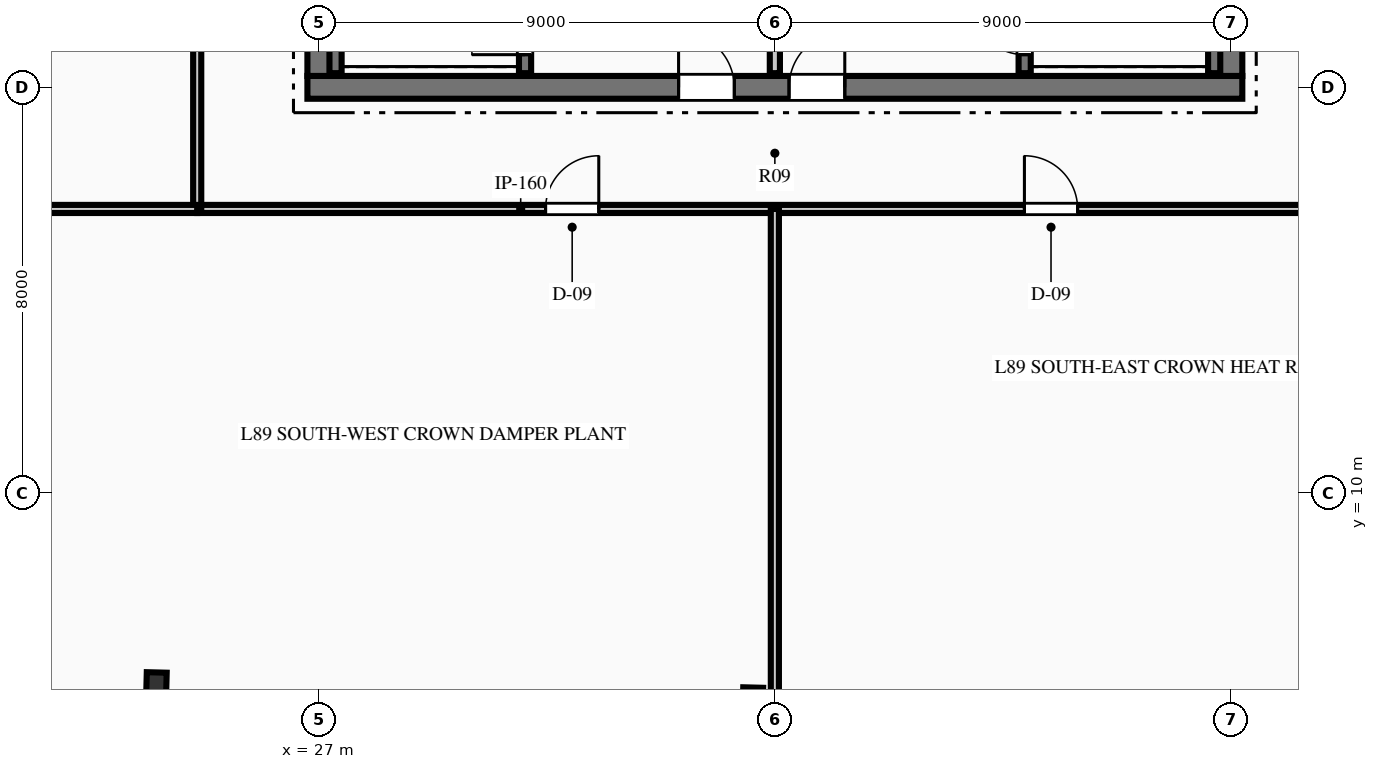
"""IFC4 building model, lengths in metres.
Left out: names, types, materials, properties, quantities, classifications, styles, units other than length and angle.
Written with IfcOpenShell. Run it as: python <this file> out.ifc"""

import sys

from ifc_helpers import new_model, si_unit, direction, frame, frame_2d, origin, origin_2d, place, context, subcontext, project, spatial, rectangle, i_section, extrude, element, fill, save


model = new_model("IFC4")
c1 = context("Model", 3, precision=1e-05, world=origin(), true_north=direction((0.0, 1.0)))
c2 = subcontext(c1, "Body", "Model", "MODEL_VIEW")
j1 = project(units=[si_unit("LENGTHUNIT", "METRE"), si_unit("PLANEANGLEUNIT", "RADIAN")], contexts=[c1])
p1 = place(None, origin())
s1 = spatial("IfcSite", under=j1, at=p1, CompositionType="ELEMENT")
p2 = place(p1, origin())
s2 = spatial("IfcBuilding", under=s1, at=p2, CompositionType="ELEMENT")
p3 = place(p2, frame((0.0, 0.0, 352.2)))
s3 = spatial("IfcBuildingStorey", under=s2, at=p3, CompositionType="ELEMENT", Elevation=352.2)
p4 = place(p3, frame((26.775, 18.0, 0.0), z_axis=(0.0, 0.0, 1.0), x_axis=(1.0, 0.0, 0.0)))
e1 = element("IfcWall", 1, at=p4, inside=s3, PredefinedType="SHEAR", context=c2, shape_type="SweptSolid", body=[
    extrude(rectangle(XDim=18.45, YDim=0.45, at=frame_2d((9.225, 0.0))), origin(), (0.0, 0.0, 1.0), 4.2),
])
p5 = place(p4, frame((7.325, 0.0, 0.0)))
e2 = element("IfcOpeningElement", 2, at=p5, cuts=e1, PredefinedType="OPENING", context=c2, shape_type="SweptSolid", body=[
    extrude(rectangle(XDim=1.1, YDim=2.15, at=frame_2d((0.55, 1.075))), frame((0.0, 0.235, 0.0), z_axis=(0.0, -1.0, 0.0), x_axis=(1.0, 0.0, 0.0)), (0.0, 0.0, 1.0), 0.47),
])
p6 = place(p4, frame((9.505, 0.0, 0.0)))
e3 = element("IfcOpeningElement", 3, at=p6, cuts=e1, PredefinedType="OPENING", context=c2, shape_type="SweptSolid", body=[
    extrude(rectangle(XDim=1.1, YDim=2.15, at=frame_2d((0.55, 1.075))), frame((0.0, 0.235, 0.0), z_axis=(0.0, -1.0, 0.0), x_axis=(1.0, 0.0, 0.0)), (0.0, 0.0, 1.0), 0.47),
])
p7 = place(p3, frame((27.0, 18.225, 0.0), z_axis=(0.0, 0.0, 1.0), x_axis=(0.0, 1.0, 0.0)))
e4 = element("IfcWall", 4, at=p7, inside=s3, PredefinedType="SHEAR", context=c2, shape_type="SweptSolid", body=[
    extrude(rectangle(XDim=15.55, YDim=0.45, at=frame_2d((7.775, 0.0))), origin(), (0.0, 0.0, 1.0), 4.2),
])
p8 = place(p7, frame((10.015, 0.0, 0.0)))
e5 = element("IfcOpeningElement", 5, at=p8, cuts=e4, PredefinedType="OPENING", context=c2, shape_type="SweptSolid", body=[
    extrude(rectangle(XDim=1.4, YDim=2.2, at=frame_2d((0.7, 1.1))), frame((0.0, 0.235, 0.0), z_axis=(0.0, -1.0, 0.0), x_axis=(1.0, 0.0, 0.0)), (0.0, 0.0, 1.0), 0.47),
])
p9 = place(p3, frame((45.0, 18.225, 0.0), z_axis=(0.0, 0.0, 1.0), x_axis=(0.0, 1.0, 0.0)))
e6 = element("IfcWall", 6, at=p9, inside=s3, PredefinedType="SHEAR", context=c2, shape_type="SweptSolid", body=[
    extrude(rectangle(XDim=15.55, YDim=0.45, at=frame_2d((7.775, 0.0))), origin(), (0.0, 0.0, 1.0), 4.2),
])
p10 = place(p9, frame((10.015, 0.0, 0.0)))
e7 = element("IfcOpeningElement", 7, at=p10, cuts=e6, PredefinedType="OPENING", context=c2, shape_type="SweptSolid", body=[
    extrude(rectangle(XDim=1.4, YDim=2.2, at=frame_2d((0.7, 1.1))), frame((0.0, 0.235, 0.0), z_axis=(0.0, -1.0, 0.0), x_axis=(1.0, 0.0, 0.0)), (0.0, 0.0, 1.0), 0.47),
])
p11 = place(p3, frame((31.07, 18.28, 0.0), z_axis=(0.0, 0.0, 1.0), x_axis=(0.0, 1.0, 0.0)))
e8 = element("IfcWall", 8, at=p11, inside=s3, PredefinedType="SHEAR", context=c2, shape_type="SweptSolid", body=[
    extrude(rectangle(XDim=8.26, YDim=0.24, at=frame_2d((4.13, 0.0))), origin(), (0.0, 0.0, 1.0), 4.2),
])
p12 = place(p11, frame((0.365, 0.0, 0.0)))
e9 = element("IfcOpeningElement", 9, at=p12, cuts=e8, PredefinedType="OPENING", context=c2, shape_type="SweptSolid", body=[
    extrude(rectangle(XDim=1.05, YDim=2.15, at=frame_2d((0.525, 1.075))), frame((0.0, 0.13, 0.0), z_axis=(0.0, -1.0, 0.0), x_axis=(1.0, 0.0, 0.0)), (0.0, 0.0, 1.0), 0.26),
])
p13 = place(p3, frame((27.33, 18.28, 0.0), z_axis=(0.0, 0.0, 1.0), x_axis=(0.0, 1.0, 0.0)))
e10 = element("IfcWall", 10, at=p13, inside=s3, PredefinedType="SHEAR", context=c2, shape_type="SweptSolid", body=[
    extrude(rectangle(XDim=8.26, YDim=0.24, at=frame_2d((4.13, 0.0))), origin(), (0.0, 0.0, 1.0), 4.2),
])
p14 = place(p3, frame((40.93, 18.28, 0.0), z_axis=(0.0, 0.0, 1.0), x_axis=(0.0, 1.0, 0.0)))
e11 = element("IfcWall", 11, at=p14, inside=s3, PredefinedType="SHEAR", context=c2, shape_type="SweptSolid", body=[
    extrude(rectangle(XDim=8.26, YDim=0.24, at=frame_2d((4.13, 0.0))), origin(), (0.0, 0.0, 1.0), 4.2),
])
p15 = place(p14, frame((0.365, 0.0, 0.0)))
e12 = element("IfcOpeningElement", 12, at=p15, cuts=e11, PredefinedType="OPENING", context=c2, shape_type="SweptSolid", body=[
    extrude(rectangle(XDim=1.05, YDim=2.15, at=frame_2d((0.525, 1.075))), frame((0.0, 0.13, 0.0), z_axis=(0.0, -1.0, 0.0), x_axis=(1.0, 0.0, 0.0)), (0.0, 0.0, 1.0), 0.26),
])
p16 = place(p3, frame((44.67, 18.28, 0.0), z_axis=(0.0, 0.0, 1.0), x_axis=(0.0, 1.0, 0.0)))
e13 = element("IfcWall", 13, at=p16, inside=s3, PredefinedType="SHEAR", context=c2, shape_type="SweptSolid", body=[
    extrude(rectangle(XDim=8.26, YDim=0.24, at=frame_2d((4.13, 0.0))), origin(), (0.0, 0.0, 1.0), 4.2),
])
for number, where, z_axis, x_axis in (
    (14, (23.796, 6.252, 0.0), (0.0, 0.0, 1.0), (0.025, 1.0, 0.0)),
    (15, (35.568, 5.955, 0.0), (0.0, 0.0, 1.0), (0.025, 1.0, 0.0)),
):
    element("IfcColumn", number, at=place(p3, frame(where, z_axis=z_axis, x_axis=x_axis)), inside=s3, PredefinedType="COLUMN", context=c2, shape_type="SweptSolid", body=[
        extrude(i_section(OverallWidth=0.4, OverallDepth=0.393, WebThickness=0.023, FlangeThickness=0.037, at=origin_2d()), origin(), (0.0, 0.0, 1.0), 4.2),
    ])
p17 = place(p3, frame((56.86, 6.015, 0.0), z_axis=(0.0, 0.0, 1.0), x_axis=(-0.993372706006, -0.114937665551, 0.0)))
e16 = element("IfcWall", 16, at=p17, inside=s3, PredefinedType="STANDARD", context=c2, shape_type="SweptSolid", body=[
    extrude(rectangle(XDim=36.675, YDim=0.25, at=frame_2d((18.337, 0.0))), origin(), (0.0, 0.0, 1.0), 3.8),
])
p18 = place(p3, frame((36.0, 18.28, 0.0), z_axis=(0.0, 0.0, 1.0), x_axis=(0.0, 1.0, 0.0)))
e17 = element("IfcWall", 17, at=p18, inside=s3, PredefinedType="PARTITIONING", context=c2, shape_type="SweptSolid", body=[
    extrude(rectangle(XDim=3.77, YDim=0.2, at=frame_2d((1.885, 0.0))), origin(), (0.0, 0.0, 1.0), 3.8),
])
p19 = place(p3, frame((24.6, 15.6, 0.0), z_axis=(0.0, 0.0, 1.0), x_axis=(1.0, 0.0, 0.0)))
e18 = element("IfcWall", 18, at=p19, inside=s3, PredefinedType="PARTITIONING", context=c2, shape_type="SweptSolid", body=[
    extrude(rectangle(XDim=22.8, YDim=0.16, at=frame_2d((11.4, 0.0))), origin(), (0.0, 0.0, 1.0), 3.8),
])
p20 = place(p19, frame((6.875, 0.0, 0.0)))
e19 = element("IfcOpeningElement", 19, at=p20, cuts=e18, PredefinedType="OPENING", context=c2, shape_type="SweptSolid", body=[
    extrude(rectangle(XDim=1.05, YDim=2.15, at=frame_2d((0.525, 1.075))), frame((0.0, 0.09, 0.0), z_axis=(0.0, -1.0, 0.0), x_axis=(1.0, 0.0, 0.0)), (0.0, 0.0, 1.0), 0.18),
])
p21 = place(p19, frame((16.325, 0.0, 0.0)))
e20 = element("IfcOpeningElement", 20, at=p21, cuts=e18, PredefinedType="OPENING", context=c2, shape_type="SweptSolid", body=[
    extrude(rectangle(XDim=1.05, YDim=2.15, at=frame_2d((0.525, 1.075))), frame((0.0, 0.09, 0.0), z_axis=(0.0, -1.0, 0.0), x_axis=(1.0, 0.0, 0.0)), (0.0, 0.0, 1.0), 0.18),
])
p22 = place(p3, frame((24.6, 15.6, 0.0), z_axis=(0.0, 0.0, 1.0), x_axis=(0.0, 1.0, 0.0)))
e21 = element("IfcWall", 21, at=p22, inside=s3, PredefinedType="PARTITIONING", context=c2, shape_type="SweptSolid", body=[
    extrude(rectangle(XDim=20.8, YDim=0.16, at=frame_2d((10.4, 0.0))), origin(), (0.0, 0.0, 1.0), 3.8),
])
p23 = place(p22, frame((8.825, 0.0, 0.0)))
e22 = element("IfcOpeningElement", 22, at=p23, cuts=e21, PredefinedType="OPENING", context=c2, shape_type="SweptSolid", body=[
    extrude(rectangle(XDim=1.05, YDim=2.15, at=frame_2d((0.525, 1.075))), frame((0.0, 0.09, 0.0), z_axis=(0.0, -1.0, 0.0), x_axis=(1.0, 0.0, 0.0)), (0.0, 0.0, 1.0), 0.18),
])
p24 = place(p3, frame((36.0, 3.642, 0.0), z_axis=(0.0, 0.0, 1.0), x_axis=(0.0, 1.0, 0.0)))
e23 = element("IfcWall", 23, at=p24, inside=s3, PredefinedType="PARTITIONING", context=c2, shape_type="SweptSolid", body=[
    extrude(rectangle(XDim=11.958, YDim=0.16, at=frame_2d((5.979, 0.0))), origin(), (0.0, 0.0, 1.0), 3.8),
])
p25 = place(p3, frame((15.147, 15.6, 0.0), z_axis=(0.0, 0.0, 1.0), x_axis=(1.0, 0.0, 0.0)))
e24 = element("IfcWall", 24, at=p25, inside=s3, PredefinedType="PARTITIONING", context=c2, shape_type="SweptSolid", body=[
    extrude(rectangle(XDim=9.453, YDim=0.16, at=frame_2d((4.727, 0.0))), origin(), (0.0, 0.0, 1.0), 3.8),
])
p26 = place(p12, origin())
e25 = element("IfcDoor", 25, at=p26, inside=s3, OperationType="SINGLE_SWING_LEFT", PredefinedType="DOOR", context=c2, shape_type="SweptSolid", body=[
    extrude(rectangle(XDim=1.05, YDim=2.15, at=frame_2d((0.525, 1.075))), frame((0.0, 0.025, 0.0), z_axis=(0.0, -1.0, 0.0), x_axis=(1.0, 0.0, 0.0)), (0.0, 0.0, 1.0), 0.05),
])
fill(e9, e25)
p27 = place(p15, origin())
e26 = element("IfcDoor", 26, at=p27, inside=s3, OperationType="SINGLE_SWING_RIGHT", PredefinedType="DOOR", context=c2, shape_type="SweptSolid", body=[
    extrude(rectangle(XDim=1.05, YDim=2.15, at=frame_2d((0.525, 1.075))), frame((0.0, 0.025, 0.0), z_axis=(0.0, -1.0, 0.0), x_axis=(1.0, 0.0, 0.0)), (0.0, 0.0, 1.0), 0.05),
])
fill(e12, e26)
p28 = place(p5, origin())
e27 = element("IfcDoor", 27, at=p28, inside=s3, OperationType="SINGLE_SWING_LEFT", PredefinedType="DOOR", context=c2, shape_type="SweptSolid", body=[
    extrude(rectangle(XDim=1.1, YDim=2.15, at=frame_2d((0.55, 1.075))), frame((0.0, 0.025, 0.0), z_axis=(0.0, -1.0, 0.0), x_axis=(1.0, 0.0, 0.0)), (0.0, 0.0, 1.0), 0.05),
])
fill(e2, e27)
p29 = place(p6, origin())
e28 = element("IfcDoor", 28, at=p29, inside=s3, OperationType="SINGLE_SWING_RIGHT", PredefinedType="DOOR", context=c2, shape_type="SweptSolid", body=[
    extrude(rectangle(XDim=1.1, YDim=2.15, at=frame_2d((0.55, 1.075))), frame((0.0, 0.025, 0.0), z_axis=(0.0, -1.0, 0.0), x_axis=(1.0, 0.0, 0.0)), (0.0, 0.0, 1.0), 0.05),
])
fill(e3, e28)
p30 = place(p20, origin())
e29 = element("IfcDoor", 29, at=p30, inside=s3, OperationType="SINGLE_SWING_RIGHT", PredefinedType="DOOR", context=c2, shape_type="SweptSolid", body=[
    extrude(rectangle(XDim=1.05, YDim=2.15, at=frame_2d((0.525, 1.075))), frame((0.0, 0.025, 0.0), z_axis=(0.0, -1.0, 0.0), x_axis=(1.0, 0.0, 0.0)), (0.0, 0.0, 1.0), 0.05),
])
fill(e19, e29)
p31 = place(p21, origin())
e30 = element("IfcDoor", 30, at=p31, inside=s3, OperationType="SINGLE_SWING_LEFT", PredefinedType="DOOR", context=c2, shape_type="SweptSolid", body=[
    extrude(rectangle(XDim=1.05, YDim=2.15, at=frame_2d((0.525, 1.075))), frame((0.0, 0.025, 0.0), z_axis=(0.0, -1.0, 0.0), x_axis=(1.0, 0.0, 0.0)), (0.0, 0.0, 1.0), 0.05),
])
fill(e20, e30)
save(model, sys.argv[1])
